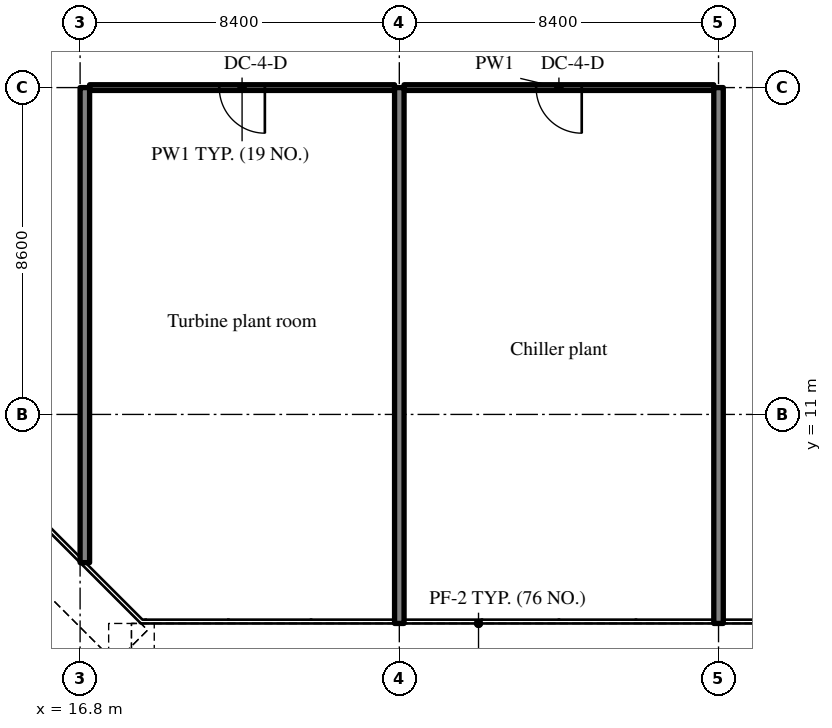
"""IFC4 building model, lengths in metres.
Left out: names, types, materials, properties, quantities, classifications, styles, units other than length and angle.
Written with IfcOpenShell. Run it as: python <this file> out.ifc"""

import sys

from ifc_helpers import new_model, si_unit, direction, frame, frame_2d, origin, place, context, subcontext, project, spatial, rectangle, extrude, source, transform, mapped, element, fill, save


model = new_model("IFC4")
c1 = context("Model", 3, precision=1e-05, world=origin(), true_north=direction((0.0, 1.0)))
c2 = subcontext(c1, "Body", "Model", "MODEL_VIEW")
j1 = project(units=[si_unit("LENGTHUNIT", "METRE"), si_unit("PLANEANGLEUNIT", "RADIAN")], contexts=[c1])
p1 = place(None, origin())
s1 = spatial("IfcSite", under=j1, at=p1, CompositionType="ELEMENT")
p2 = place(p1, origin())
s2 = spatial("IfcBuilding", under=s1, at=p2, CompositionType="ELEMENT")
p3 = place(p2, frame((0.0, 0.0, 317.7)))
s3 = spatial("IfcBuildingStorey", under=s2, at=p3, CompositionType="ELEMENT", Elevation=317.7)
m1 = source(origin(), c2, "Body", "SweptSolid", [
    extrude(rectangle(XDim=12.5, YDim=0.25, at=frame_2d((6.25, 0.0))), origin(), (0.0, 0.0, 1.0), 5.72),
])
p4 = place(p3, frame((16.925, 7.1, 0.0), z_axis=(0.0, 0.0, 1.0), x_axis=(0.0, 1.0, 0.0)))
e1 = element("IfcWall", 1, at=p4, inside=s3, PredefinedType="SHEAR", context=c2, shape_type="MappedRepresentation", body=[
    mapped(m1, transform((0.0, 0.0, 0.0), scale=1.0)),
])
m2 = source(origin(), c2, "Body", "SweptSolid", [
    extrude(rectangle(XDim=14.1, YDim=0.25, at=frame_2d((7.05, 0.0))), origin(), (0.0, 0.0, 1.0), 5.72),
])
for number, where, z_axis, x_axis in (
    (2, (25.2, 5.5, 0.0), (0.0, 0.0, 1.0), (0.0, 1.0, 0.0)),
    (3, (33.6, 5.5, 0.0), (0.0, 0.0, 1.0), (0.0, 1.0, 0.0)),
):
    element("IfcWall", number, at=place(p3, frame(where, z_axis=z_axis, x_axis=x_axis)), inside=s3, PredefinedType="SHEAR", context=c2, shape_type="MappedRepresentation", body=[
        mapped(m2, transform((0.0, 0.0, 0.0), scale=1.0)),
    ])
m3 = source(origin(), c2, "Body", "SweptSolid", [
    extrude(rectangle(XDim=8.025, YDim=0.15, at=frame_2d((4.012, 0.0))), origin(), (0.0, 0.0, 1.0), 4.97),
])
p5 = place(p3, frame((17.05, 19.6, 0.0), z_axis=(0.0, 0.0, 1.0), x_axis=(1.0, 0.0, 0.0)))
e4 = element("IfcWall", 4, at=p5, inside=s3, PredefinedType="PARTITIONING", context=c2, shape_type="MappedRepresentation", body=[
    mapped(m3, transform((0.0, 0.0, 0.0), scale=1.0)),
])
m4 = source(origin(), c2, "Body", "SweptSolid", [
    extrude(rectangle(XDim=1.2, YDim=2.1, at=frame_2d((0.6, 1.05))), frame((0.0, 0.085, 0.0), z_axis=(0.0, -1.0, 0.0), x_axis=(1.0, 0.0, 0.0)), (0.0, 0.0, 1.0), 0.17),
])
p6 = place(p5, frame((3.412, 0.0, 0.0)))
e5 = element("IfcOpeningElement", 5, at=p6, cuts=e4, PredefinedType="OPENING", context=c2, shape_type="MappedRepresentation", body=[
    mapped(m4, transform((0.0, 0.0, 0.0), scale=1.0)),
])
m5 = source(origin(), c2, "Body", "SweptSolid", [
    extrude(rectangle(XDim=8.15, YDim=0.15, at=frame_2d((4.075, 0.0))), origin(), (0.0, 0.0, 1.0), 4.97),
])
p7 = place(p3, frame((25.325, 19.6, 0.0), z_axis=(0.0, 0.0, 1.0), x_axis=(1.0, 0.0, 0.0)))
e6 = element("IfcWall", 6, at=p7, inside=s3, PredefinedType="PARTITIONING", context=c2, shape_type="MappedRepresentation", body=[
    mapped(m5, transform((0.0, 0.0, 0.0), scale=1.0)),
])
p8 = place(p7, frame((3.475, 0.0, 0.0)))
e7 = element("IfcOpeningElement", 7, at=p8, cuts=e6, PredefinedType="OPENING", context=c2, shape_type="MappedRepresentation", body=[
    mapped(m4, transform((0.0, 0.0, 0.0), scale=1.0)),
])
m6 = source(origin(), c2, "Body", "SweptSolid", [
    extrude(rectangle(XDim=1.2, YDim=2.1, at=frame_2d((0.6, 1.05))), frame((0.0, 0.025, 0.0), z_axis=(0.0, -1.0, 0.0), x_axis=(1.0, 0.0, 0.0)), (0.0, 0.0, 1.0), 0.05),
])
p9 = place(p6, origin())
e8 = element("IfcDoor", 8, at=p9, inside=s3, OperationType="SINGLE_SWING_RIGHT", PredefinedType="DOOR", context=c2, shape_type="MappedRepresentation", body=[
    mapped(m6, transform((0.0, 0.0, 0.0), scale=1.0)),
])
fill(e5, e8)
p10 = place(p8, origin())
e9 = element("IfcDoor", 9, at=p10, inside=s3, OperationType="SINGLE_SWING_RIGHT", PredefinedType="DOOR", context=c2, shape_type="MappedRepresentation", body=[
    mapped(m6, transform((0.0, 0.0, 0.0), scale=1.0)),
])
fill(e7, e9)
save(model, sys.argv[1])
